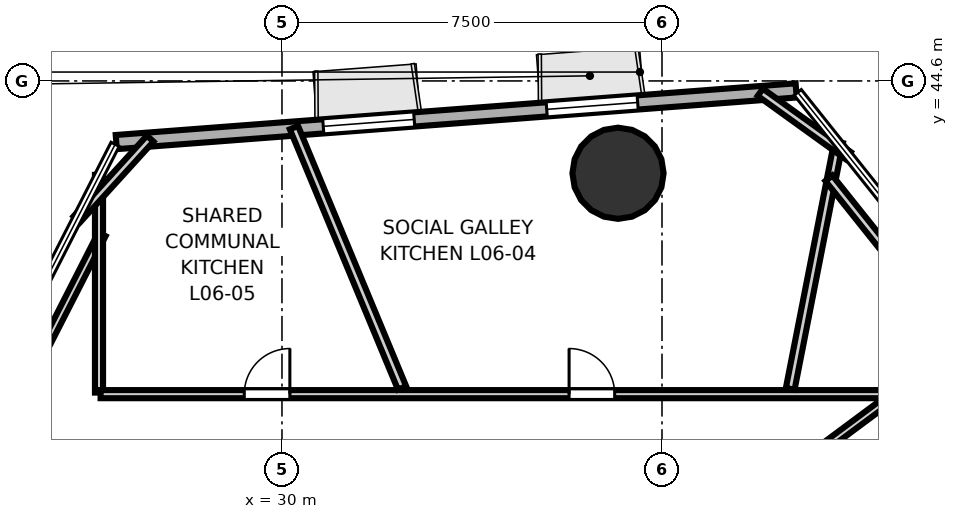
"""IFC4 building model, lengths in metres.
Left out: names, types, materials, properties, quantities, classifications, styles, units other than length and angle.
Written with IfcOpenShell. Run it as: python <this file> out.ifc"""

import sys

from ifc_helpers import new_model, si_unit, direction, frame, frame_2d, origin, origin_2d, place, context, subcontext, project, spatial, rectangle, hollow_circle, extrude, element, fill, save


model = new_model("IFC4")
c1 = context("Model", 3, precision=1e-05, world=origin(), true_north=direction((0.0, 1.0)))
c2 = subcontext(c1, "Body", "Model", "MODEL_VIEW")
j1 = project(units=[si_unit("LENGTHUNIT", "METRE"), si_unit("PLANEANGLEUNIT", "RADIAN")], contexts=[c1])
p1 = place(None, origin())
s1 = spatial("IfcSite", under=j1, at=p1, CompositionType="ELEMENT")
p2 = place(p1, origin())
s2 = spatial("IfcBuilding", under=s1, at=p2, CompositionType="ELEMENT")
p3 = place(p2, frame((0.0, 0.0, 29.4)))
s3 = spatial("IfcBuildingStorey", under=s2, at=p3, CompositionType="ELEMENT", Elevation=29.4)
p4 = place(p3, frame((36.632, 42.778, 0.0), z_axis=(0.0, 0.0, 1.0), x_axis=(1.0, 0.0, 0.0)))
e1 = element("IfcColumn", 1, at=p4, inside=s3, PredefinedType="COLUMN", context=c2, shape_type="SweptSolid", body=[
    extrude(hollow_circle(Radius=0.9, WallThickness=0.045, at=origin_2d()), origin(), (0.0, 0.0, 1.0), 3.7),
])
p5 = place(p3, frame((40.147, 44.413, 0.0), z_axis=(0.0, 0.0, 1.0), x_axis=(-0.997124396063, -0.07578217981, 0.0)))
e2 = element("IfcWall", 2, at=p5, inside=s3, PredefinedType="SOLIDWALL", context=c2, shape_type="SweptSolid", body=[
    extrude(rectangle(XDim=13.457, YDim=0.28, at=frame_2d((6.728, 0.0))), origin(), (0.0, 0.0, 1.0), 3.52),
])
p6 = place(p5, frame((3.137, 0.0, 0.85)))
e3 = element("IfcOpeningElement", 3, at=p6, cuts=e2, PredefinedType="OPENING", context=c2, shape_type="SweptSolid", body=[
    extrude(rectangle(XDim=1.8, YDim=2.1, at=frame_2d((0.9, 1.05))), frame((0.0, 0.15, 0.0), z_axis=(0.0, -1.0, 0.0), x_axis=(1.0, 0.0, 0.0)), (0.0, 0.0, 1.0), 0.3),
])
p7 = place(p5, frame((7.56, 0.0, 0.85)))
e4 = element("IfcOpeningElement", 4, at=p7, cuts=e2, PredefinedType="OPENING", context=c2, shape_type="SweptSolid", body=[
    extrude(rectangle(XDim=1.8, YDim=2.1, at=frame_2d((0.9, 1.05))), frame((0.0, 0.15, 0.0), z_axis=(0.0, -1.0, 0.0), x_axis=(1.0, 0.0, 0.0)), (0.0, 0.0, 1.0), 0.3),
])
p8 = place(p3, frame((23.578, 35.951, 0.0), z_axis=(0.0, 0.0, 1.0), x_axis=(0.454592450263, 0.890699558866, 0.0)))
e5 = element("IfcWall", 5, at=p8, inside=s3, PredefinedType="PARTITIONING", context=c2, shape_type="SweptSolid", body=[
    extrude(rectangle(XDim=6.313, YDim=0.16, at=frame_2d((3.156, 0.0))), origin(), (0.0, 0.0, 1.0), 2.84),
])
p9 = place(p3, frame((26.389, 42.746, 0.0), z_axis=(0.0, 0.0, 1.0), x_axis=(0.0, -1.0, 0.0)))
e6 = element("IfcWall", 6, at=p9, inside=s3, PredefinedType="PARTITIONING", context=c2, shape_type="SweptSolid", body=[
    extrude(rectangle(XDim=4.296, YDim=0.16, at=frame_2d((2.148, 0.0))), origin(), (0.0, 0.0, 1.0), 2.84),
])
p10 = place(p3, frame((26.42, 38.419, 0.0), z_axis=(0.0, 0.0, 1.0), x_axis=(1.0, 0.0, 0.0)))
e7 = element("IfcWall", 7, at=p10, inside=s3, PredefinedType="PARTITIONING", context=c2, shape_type="SweptSolid", body=[
    extrude(rectangle(XDim=15.783, YDim=0.16, at=frame_2d((7.892, 0.0))), origin(), (0.0, 0.0, 1.0), 2.798),
])
p11 = place(p10, frame((9.246, 0.0, 0.0)))
e8 = element("IfcOpeningElement", 8, at=p11, cuts=e7, PredefinedType="OPENING", context=c2, shape_type="SweptSolid", body=[
    extrude(rectangle(XDim=0.9, YDim=2.1, at=frame_2d((0.45, 1.05))), frame((0.0, 0.09, 0.0), z_axis=(0.0, -1.0, 0.0), x_axis=(1.0, 0.0, 0.0)), (0.0, 0.0, 1.0), 0.18),
])
p12 = place(p10, frame((2.836, 0.0, 0.0)))
e9 = element("IfcOpeningElement", 9, at=p12, cuts=e7, PredefinedType="OPENING", context=c2, shape_type="SweptSolid", body=[
    extrude(rectangle(XDim=0.9, YDim=2.1, at=frame_2d((0.45, 1.05))), frame((0.0, 0.09, 0.0), z_axis=(0.0, -1.0, 0.0), x_axis=(1.0, 0.0, 0.0)), (0.0, 0.0, 1.0), 0.18),
])
p13 = place(p3, frame((42.185, 38.475, 0.0), z_axis=(0.0, 0.0, 1.0), x_axis=(-0.802818467394, -0.596223538961, 0.0)))
e10 = element("IfcWall", 10, at=p13, inside=s3, PredefinedType="PARTITIONING", context=c2, shape_type="SweptSolid", body=[
    extrude(rectangle(XDim=2.953, YDim=0.16, at=frame_2d((1.477, 0.0))), origin(), (0.0, 0.0, 1.0), 2.798),
])
p14 = place(p3, frame((40.031, 38.524, 0.0), z_axis=(0.0, 0.0, 1.0), x_axis=(0.192440494931, 0.981308644571, 0.0)))
e11 = element("IfcWall", 11, at=p14, inside=s3, PredefinedType="PLUMBINGWALL", context=c2, shape_type="SweptSolid", body=[
    extrude(rectangle(XDim=4.958, YDim=0.175, at=frame_2d((2.479, 0.0))), origin(), (0.0, 0.0, 1.0), 2.798),
])
p15 = place(p3, frame((40.794, 42.681, 0.0), z_axis=(0.0, 0.0, 1.0), x_axis=(0.623977950445, -0.781441947529, 0.0)))
e12 = element("IfcWall", 12, at=p15, inside=s3, PredefinedType="PLUMBINGWALL", context=c2, shape_type="SweptSolid", body=[
    extrude(rectangle(XDim=11.588, YDim=0.175, at=frame_2d((5.794, 0.0))), origin(), (0.0, 0.0, 1.0), 2.84),
])
p16 = place(p3, frame((39.44, 44.376, 0.0), z_axis=(0.0, 0.0, 1.0), x_axis=(0.81138921051, -0.584506243822, 0.0)))
e13 = element("IfcWall", 13, at=p16, inside=s3, PredefinedType="PLUMBINGWALL", context=c2, shape_type="SweptSolid", body=[
    extrude(rectangle(XDim=2.138, YDim=0.175, at=frame_2d((1.069, 0.0))), origin(), (0.0, 0.0, 1.0), 2.84),
])
p17 = place(p3, frame((32.37, 38.542, 0.0), z_axis=(0.0, 0.0, 1.0), x_axis=(-0.383564864304, 0.923513938645, 0.0)))
e14 = element("IfcWall", 14, at=p17, inside=s3, PredefinedType="PLUMBINGWALL", context=c2, shape_type="SweptSolid", body=[
    extrude(rectangle(XDim=5.562, YDim=0.175, at=frame_2d((2.781, 0.0))), origin(), (0.0, 0.0, 1.0), 2.798),
])
p18 = place(p3, frame((25.952, 41.869, 0.0), z_axis=(0.0, 0.0, 1.0), x_axis=(0.672672793996, 0.739940073396, 0.0)))
e15 = element("IfcWall", 15, at=p18, inside=s3, PredefinedType="PLUMBINGWALL", context=c2, shape_type="SweptSolid", body=[
    extrude(rectangle(XDim=2.152, YDim=0.175, at=frame_2d((1.076, 0.0))), origin(), (0.0, 0.0, 1.0), 2.84),
])
p19 = place(p11, origin())
e16 = element("IfcDoor", 16, at=p19, inside=s3, OperationType="SINGLE_SWING_LEFT", PredefinedType="DOOR", context=c2, shape_type="SweptSolid", body=[
    extrude(rectangle(XDim=0.9, YDim=2.1, at=frame_2d((0.45, 1.05))), frame((0.0, 0.025, 0.0), z_axis=(0.0, -1.0, 0.0), x_axis=(1.0, 0.0, 0.0)), (0.0, 0.0, 1.0), 0.05),
])
fill(e8, e16)
p20 = place(p12, origin())
e17 = element("IfcDoor", 17, at=p20, inside=s3, OperationType="SINGLE_SWING_RIGHT", PredefinedType="DOOR", context=c2, shape_type="SweptSolid", body=[
    extrude(rectangle(XDim=0.9, YDim=2.1, at=frame_2d((0.45, 1.05))), frame((0.0, 0.025, 0.0), z_axis=(0.0, -1.0, 0.0), x_axis=(1.0, 0.0, 0.0)), (0.0, 0.0, 1.0), 0.05),
])
fill(e9, e17)
p21 = place(p6, origin())
e18 = element("IfcWindow", 18, at=p21, inside=s3, PartitioningType="SINGLE_PANEL", PredefinedType="WINDOW", context=c2, shape_type="SweptSolid", body=[
    extrude(rectangle(XDim=1.8, YDim=2.1, at=frame_2d((0.9, 1.05))), frame((0.0, 0.03, 0.0), z_axis=(0.0, -1.0, 0.0), x_axis=(1.0, 0.0, 0.0)), (0.0, 0.0, 1.0), 0.06),
])
fill(e3, e18)
p22 = place(p7, origin())
e19 = element("IfcWindow", 19, at=p22, inside=s3, PartitioningType="SINGLE_PANEL", PredefinedType="WINDOW", context=c2, shape_type="SweptSolid", body=[
    extrude(rectangle(XDim=1.8, YDim=2.1, at=frame_2d((0.9, 1.05))), frame((0.0, 0.03, 0.0), z_axis=(0.0, -1.0, 0.0), x_axis=(1.0, 0.0, 0.0)), (0.0, 0.0, 1.0), 0.06),
])
fill(e4, e19)
save(model, sys.argv[1])
